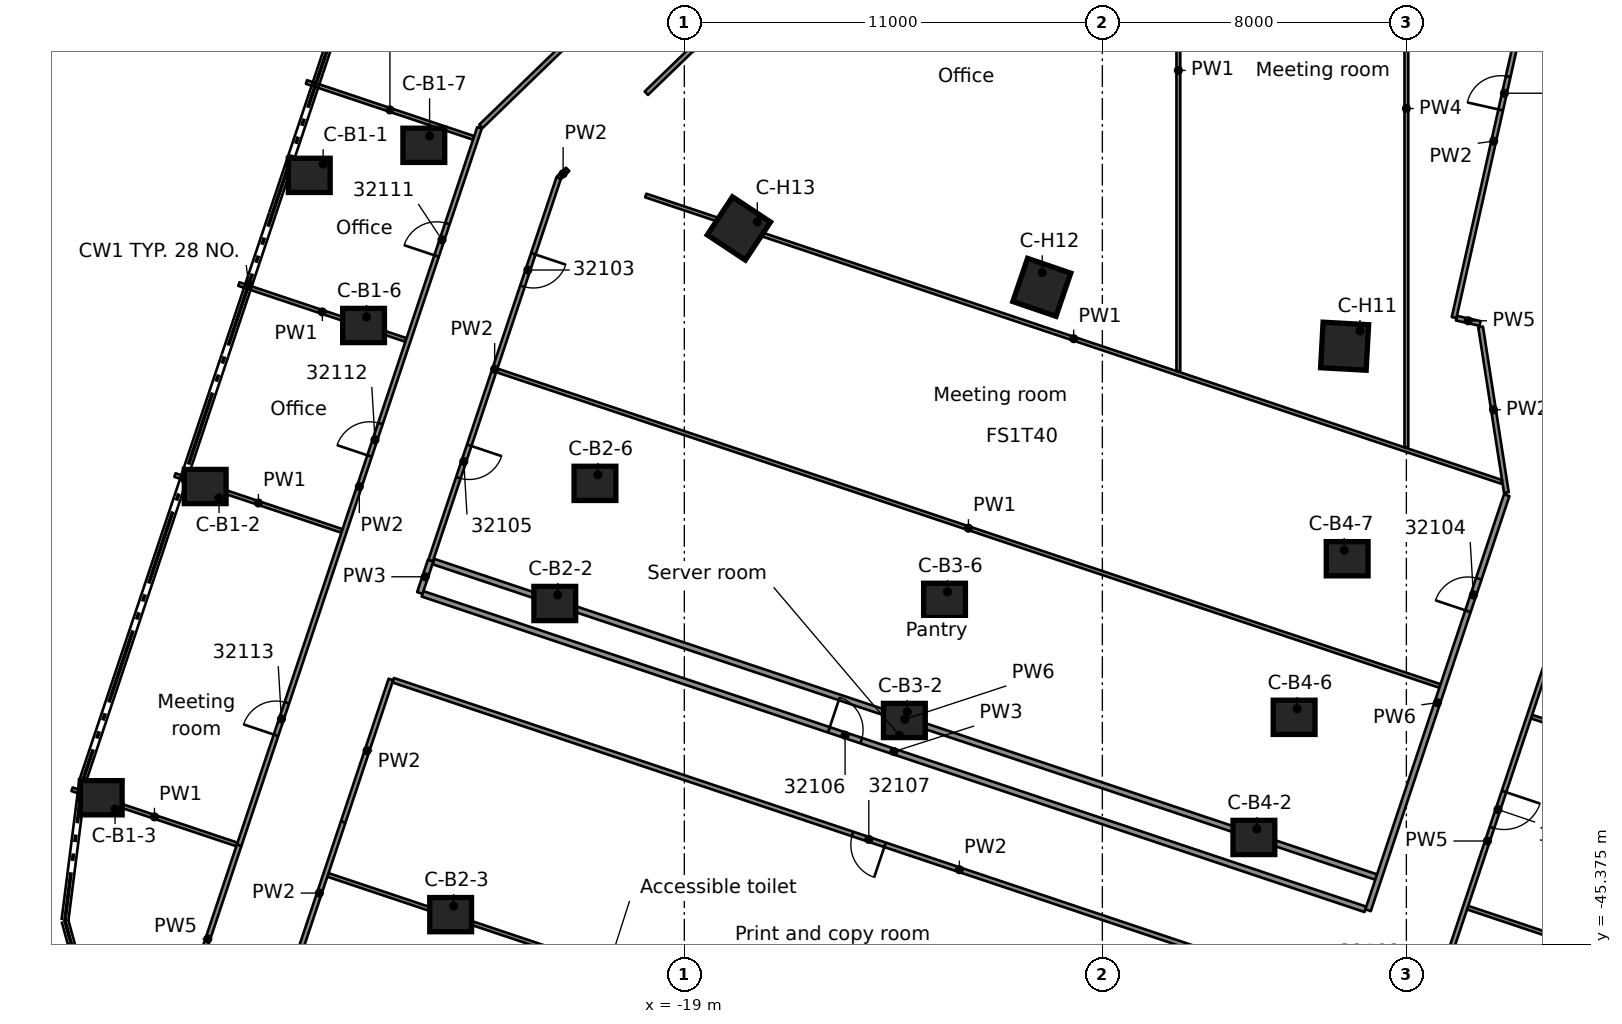
"""IFC4 building model, lengths in metres.
Left out: names, types, materials, properties, quantities, classifications, styles, units other than length and angle.
Written with IfcOpenShell. Run it as: python <this file> out.ifc"""

import sys

from ifc_helpers import new_model, si_unit, direction, frame, frame_2d, origin, origin_2d, place, context, subcontext, project, spatial, rectangle, extrude, element, fill, save


model = new_model("IFC4")
c1 = context("Model", 3, precision=1e-05, world=origin(), true_north=direction((0.0, 1.0)))
c2 = subcontext(c1, "Body", "Model", "MODEL_VIEW")
j1 = project(units=[si_unit("LENGTHUNIT", "METRE"), si_unit("PLANEANGLEUNIT", "RADIAN")], contexts=[c1])
p1 = place(None, origin())
s1 = spatial("IfcSite", under=j1, at=p1, CompositionType="ELEMENT")
p2 = place(p1, origin())
s2 = spatial("IfcBuilding", under=s1, at=p2, CompositionType="ELEMENT")
p3 = place(p2, frame((0.0, 0.0, 159.6)))
s3 = spatial("IfcBuildingStorey", under=s2, at=p3, CompositionType="ELEMENT", Elevation=159.6)
for number, where, z_axis, x_axis in (
    (1, (-28.869, -25.139, 0.0), (0.0, 0.0, 1.0), (1.0, 0.0, 0.0)),
    (2, (-31.608, -33.326, 0.0), (0.0, 0.0, 1.0), (1.0, 0.0, 0.0)),
    (3, (-34.344, -41.515, 0.0), (0.0, 0.0, 1.0), (1.0, 0.0, 0.0)),
    (4, (-27.441, -29.089, 0.0), (0.0, 0.0, 1.0), (1.0, 0.0, 0.0)),
    (5, (-25.855, -24.348, 0.0), (0.0, 0.0, 1.0), (1.0, 0.0, 0.0)),
    (6, (-22.409, -36.404, 0.0), (0.0, 0.0, 1.0), (1.0, 0.0, 0.0)),
    (7, (-25.149, -44.591, 0.0), (0.0, 0.0, 1.0), (1.0, 0.0, 0.0)),
    (8, (-21.352, -33.243, 0.0), (0.0, 0.0, 1.0), (1.0, 0.0, 0.0)),
    (9, (-13.21, -39.482, 0.0), (0.0, 0.0, 1.0), (1.0, 0.0, 0.0)),
    (10, (-12.153, -36.321, 0.0), (0.0, 0.0, 1.0), (1.0, 0.0, 0.0)),
    (11, (-4.012, -42.56, 0.0), (0.0, 0.0, 1.0), (1.0, 0.0, 0.0)),
    (12, (-2.954, -39.399, 0.0), (0.0, 0.0, 1.0), (1.0, 0.0, 0.0)),
    (13, (-1.558, -35.226, 0.0), (0.0, 0.0, 1.0), (1.0, 0.0, 0.0)),
):
    element("IfcColumn", number, at=place(p3, frame(where, z_axis=z_axis, x_axis=x_axis)), inside=s3, PredefinedType="COLUMN", context=c2, shape_type="SweptSolid", body=[
        extrude(rectangle(XDim=1.1, YDim=0.9, at=origin_2d()), origin(), (0.0, 0.0, 1.0), 3.5),
    ])
for number, where, z_axis, x_axis in (
    (14, (-1.625, -29.634, 0.0), (0.0, 0.0, 1.0), (-0.055, -0.998, 0.0)),
    (15, (-9.594, -28.085, 0.0), (0.0, 0.0, 1.0), (-0.323, -0.946, 0.0)),
    (16, (-17.564, -26.536, 0.0), (0.0, 0.0, 1.0), (-0.552, -0.834, 0.0)),
):
    element("IfcColumn", number, at=place(p3, frame(where, z_axis=z_axis, x_axis=x_axis)), inside=s3, PredefinedType="COLUMN", context=c2, shape_type="SweptSolid", body=[
        extrude(rectangle(XDim=1.2, YDim=1.2, at=origin_2d()), origin(), (0.0, 0.0, 1.0), 3.5),
    ])
p4 = place(p3, frame((2.632, -33.485, 0.0), z_axis=(0.0, 0.0, 1.0), x_axis=(-0.153953145405, 0.988078149247, 0.0)))
e17 = element("IfcWall", 17, at=p4, inside=s3, PredefinedType="PARTITIONING", context=c2, shape_type="SweptSolid", body=[
    extrude(rectangle(XDim=4.412, YDim=0.125, at=frame_2d((2.206, 0.0))), origin(), (0.0, 0.0, 1.0), 3.08),
])
p5 = place(p3, frame((-35.112, -41.292, 0.0), z_axis=(0.0, 0.0, 1.0), x_axis=(0.94831984375, -0.317316047419, 0.0)))
e18 = element("IfcWall", 18, at=p5, inside=s3, PredefinedType="PARTITIONING", context=c2, shape_type="SweptSolid", body=[
    extrude(rectangle(XDim=4.576, YDim=0.1, at=frame_2d((2.288, 0.0))), origin(), (0.0, 0.0, 1.0), 3.08),
])
p6 = place(p3, frame((-28.378, -43.546, 0.0), z_axis=(0.0, 0.0, 1.0), x_axis=(0.948326561211, -0.317295971139, 0.0)))
e19 = element("IfcWall", 19, at=p6, inside=s3, PredefinedType="PARTITIONING", context=c2, shape_type="SweptSolid", body=[
    extrude(rectangle(XDim=26.187, YDim=0.1, at=frame_2d((13.094, 0.0))), origin(), (0.0, 0.0, 1.0), 2.445),
])
p7 = place(p3, frame((-1.829, -46.732, 0.0), z_axis=(0.0, 0.0, 1.0), x_axis=(-0.948329366448, 0.317287586791, 0.0)))
e20 = element("IfcWall", 20, at=p7, inside=s3, PredefinedType="PARTITIONING", context=c2, shape_type="SweptSolid", body=[
    extrude(rectangle(XDim=26.187, YDim=0.125, at=frame_2d((13.094, 0.0))), origin(), (0.0, 0.0, 1.0), 3.08),
])
p8 = place(p7, frame((12.538, 0.0, 0.0)))
e21 = element("IfcOpeningElement", 21, at=p8, cuts=e20, PredefinedType="OPENING", context=c2, shape_type="SweptSolid", body=[
    extrude(rectangle(XDim=0.9, YDim=2.1, at=frame_2d((0.45, 1.05))), frame((0.0, 0.073, 0.0), z_axis=(0.0, -1.0, 0.0), x_axis=(1.0, 0.0, 0.0)), (0.0, 0.0, 1.0), 0.145),
])
p9 = place(p3, frame((-25.889, -36.15, 0.0), z_axis=(0.0, 0.0, 1.0), x_axis=(0.94832621322, -0.317297011205, 0.0)))
e22 = element("IfcWall", 22, at=p9, inside=s3, PredefinedType="PARTITIONING", context=c2, shape_type="SweptSolid", body=[
    extrude(rectangle(XDim=26.162, YDim=0.15, at=frame_2d((13.081, 0.0))), origin(), (0.0, 0.0, 1.0), 3.08),
])
p10 = place(p9, frame((11.275, 0.0, 0.0)))
e23 = element("IfcOpeningElement", 23, at=p10, cuts=e22, PredefinedType="OPENING", context=c2, shape_type="SweptSolid", body=[
    extrude(rectangle(XDim=0.9, YDim=2.1, at=frame_2d((0.45, 1.05))), frame((0.0, 0.085, 0.0), z_axis=(0.0, -1.0, 0.0), x_axis=(1.0, 0.0, 0.0)), (0.0, 0.0, 1.0), 0.17),
])
p11 = place(p3, frame((-32.404, -33.025, 0.0), z_axis=(0.0, 0.0, 1.0), x_axis=(0.948382448694, -0.317128887062, 0.0)))
e24 = element("IfcWall", 24, at=p11, inside=s3, PredefinedType="PARTITIONING", context=c2, shape_type="SweptSolid", body=[
    extrude(rectangle(XDim=4.632, YDim=0.1, at=frame_2d((2.316, 0.0))), origin(), (0.0, 0.0, 1.0), 3.08),
])
p12 = place(p3, frame((-25.605, -35.3, 0.0), z_axis=(0.0, 0.0, 1.0), x_axis=(0.948327152728, -0.317294203223, 0.0)))
e25 = element("IfcWall", 25, at=p12, inside=s3, PredefinedType="PARTITIONING", context=c2, shape_type="SweptSolid", body=[
    extrude(rectangle(XDim=26.162, YDim=0.15, at=frame_2d((13.081, 0.0))), origin(), (0.0, 0.0, 1.0), 2.445),
])
p13 = place(p3, frame((1.612, -44.407, 0.0), z_axis=(0.0, 0.0, 1.0), x_axis=(0.948334710824, -0.317271612734, 0.0)))
e26 = element("IfcWall", 26, at=p13, inside=s3, PredefinedType="PARTITIONING", context=c2, shape_type="SweptSolid", body=[
    extrude(rectangle(XDim=4.63, YDim=0.1, at=frame_2d((2.315, 0.0))), origin(), (0.0, 0.0, 1.0), 2.445),
])
p14 = place(p3, frame((-30.722, -27.999, 0.0), z_axis=(0.0, 0.0, 1.0), x_axis=(0.948355935611, -0.317208164132, 0.0)))
e27 = element("IfcWall", 27, at=p14, inside=s3, PredefinedType="PARTITIONING", context=c2, shape_type="SweptSolid", body=[
    extrude(rectangle(XDim=4.631, YDim=0.1, at=frame_2d((2.315, 0.0))), origin(), (0.0, 0.0, 1.0), 3.08),
])
p15 = place(p3, frame((-23.935, -30.27, 0.0), z_axis=(0.0, 0.0, 1.0), x_axis=(0.948328260126, -0.317290893418, 0.0)))
e28 = element("IfcWall", 28, at=p15, inside=s3, PredefinedType="PARTITIONING", context=c2, shape_type="SweptSolid", body=[
    extrude(rectangle(XDim=26.175, YDim=0.1, at=frame_2d((13.087, 0.0))), origin(), (0.0, 0.0, 1.0), 3.08),
])
p16 = place(p3, frame((3.294, -39.38, 0.0), z_axis=(0.0, 0.0, 1.0), x_axis=(0.948260676976, -0.317492816455, 0.0)))
e29 = element("IfcWall", 29, at=p16, inside=s3, PredefinedType="PARTITIONING", context=c2, shape_type="SweptSolid", body=[
    extrude(rectangle(XDim=4.631, YDim=0.1, at=frame_2d((2.315, 0.0))), origin(), (0.0, 0.0, 1.0), 3.08),
])
p17 = place(p3, frame((-28.943, -22.682, 0.0), z_axis=(0.0, 0.0, 1.0), x_axis=(0.948361239818, -0.317192305725, 0.0)))
e30 = element("IfcWall", 30, at=p17, inside=s3, PredefinedType="PARTITIONING", context=c2, shape_type="SweptSolid", body=[
    extrude(rectangle(XDim=4.631, YDim=0.1, at=frame_2d((2.316, 0.0))), origin(), (0.0, 0.0, 1.0), 3.08),
])
p18 = place(p3, frame((-20.015, -25.669, 0.0), z_axis=(0.0, 0.0, 1.0), x_axis=(0.948326995597, -0.317294672854, 0.0)))
e31 = element("IfcWall", 31, at=p18, inside=s3, PredefinedType="PARTITIONING", context=c2, shape_type="SweptSolid", body=[
    extrude(rectangle(XDim=23.748, YDim=0.1, at=frame_2d((11.874, 0.0))), origin(), (0.0, 0.0, 1.0), 3.08),
])
p19 = place(p3, frame((1.317, -28.896, 0.0), z_axis=(0.0, 0.0, 1.0), x_axis=(0.9759612217, -0.217944244563, 0.0)))
e32 = element("IfcWall", 32, at=p19, inside=s3, PredefinedType="PARTITIONING", context=c2, shape_type="SweptSolid", body=[
    extrude(rectangle(XDim=0.637, YDim=0.125, at=frame_2d((0.319, 0.0))), origin(), (0.0, 0.0, 1.0), 2.445),
])
p20 = place(p3, frame((-24.354, -23.85, 0.0), z_axis=(0.0, 0.0, 1.0), x_axis=(0.718717121229, 0.695302595747, 0.0)))
e33 = element("IfcWall", 33, at=p20, inside=s3, PredefinedType="PARTITIONING", context=c2, shape_type="SweptSolid", body=[
    extrude(rectangle(XDim=6.058, YDim=0.125, at=frame_2d((3.029, 0.0))), origin(), (0.0, 0.0, 1.0), 3.08),
])
p21 = place(p3, frame((-20.0, -22.978, 0.0), z_axis=(0.0, 0.0, 1.0), x_axis=(0.718705918195, 0.695314175859, 0.0)))
e34 = element("IfcWall", 34, at=p21, inside=s3, PredefinedType="PARTITIONING", context=c2, shape_type="SweptSolid", body=[
    extrude(rectangle(XDim=3.413, YDim=0.125, at=frame_2d((1.707, 0.0))), origin(), (0.0, 0.0, 1.0), 3.08),
])
p22 = place(p3, frame((-22.308, -25.211, 0.0), z_axis=(0.0, 0.0, 1.0), x_axis=(0.717743653734, 0.696307437505, 0.0)))
e35 = element("IfcWall", 35, at=p22, inside=s3, PredefinedType="PARTITIONING", context=c2, shape_type="SweptSolid", body=[
    extrude(rectangle(XDim=0.33, YDim=0.125, at=frame_2d((0.165, 0.0))), origin(), (0.0, 0.0, 1.0), 3.08),
])
p23 = place(p3, frame((5.014, -34.047, 0.0), z_axis=(0.0, 0.0, 1.0), x_axis=(-0.317385597106, -0.948296568986, 0.0)))
e36 = element("IfcWall", 36, at=p23, inside=s3, PredefinedType="PARTITIONING", context=c2, shape_type="SweptSolid", body=[
    extrude(rectangle(XDim=18.151, YDim=0.125, at=frame_2d((9.076, 0.0))), origin(), (0.0, 0.0, 1.0), 2.445),
])
p24 = place(p23, frame((2.347, 0.0, 0.0)))
e37 = element("IfcOpeningElement", 37, at=p24, cuts=e36, PredefinedType="OPENING", context=c2, shape_type="SweptSolid", body=[
    extrude(rectangle(XDim=1.0, YDim=2.1, at=frame_2d((0.5, 1.05))), frame((0.0, 0.073, 0.0), z_axis=(0.0, -1.0, 0.0), x_axis=(1.0, 0.0, 0.0)), (0.0, 0.0, 1.0), 0.145),
])
p25 = place(p23, frame((7.703, 0.0, 0.0)))
e38 = element("IfcOpeningElement", 38, at=p25, cuts=e36, PredefinedType="OPENING", context=c2, shape_type="SweptSolid", body=[
    extrude(rectangle(XDim=1.0, YDim=2.1, at=frame_2d((0.5, 1.05))), frame((0.0, 0.073, 0.0), z_axis=(0.0, -1.0, 0.0), x_axis=(1.0, 0.0, 0.0)), (0.0, 0.0, 1.0), 0.145),
])
p26 = place(p23, frame((12.399, 0.0, 0.0)))
e39 = element("IfcOpeningElement", 39, at=p26, cuts=e36, PredefinedType="OPENING", context=c2, shape_type="SweptSolid", body=[
    extrude(rectangle(XDim=1.0, YDim=2.1, at=frame_2d((0.5, 1.05))), frame((0.0, 0.073, 0.0), z_axis=(0.0, -1.0, 0.0), x_axis=(1.0, 0.0, 0.0)), (0.0, 0.0, 1.0), 0.145),
])
p27 = place(p3, frame((-1.008, -44.475, 0.0), z_axis=(0.0, 0.0, 1.0), x_axis=(0.316889155775, 0.948462578572, 0.0)))
e40 = element("IfcWall", 40, at=p27, inside=s3, PredefinedType="PARTITIONING", context=c2, shape_type="SweptSolid", body=[
    extrude(rectangle(XDim=11.516, YDim=0.15, at=frame_2d((5.758, 0.0))), origin(), (0.0, 0.0, 1.0), 2.445),
])
p28 = place(p27, frame((8.296, 0.0, 0.0)))
e41 = element("IfcOpeningElement", 41, at=p28, cuts=e40, PredefinedType="OPENING", context=c2, shape_type="SweptSolid", body=[
    extrude(rectangle(XDim=0.9, YDim=2.1, at=frame_2d((0.45, 1.05))), frame((0.0, 0.085, 0.0), z_axis=(0.0, -1.0, 0.0), x_axis=(1.0, 0.0, 0.0)), (0.0, 0.0, 1.0), 0.17),
])
p29 = place(p3, frame((-27.976, -42.15, 0.0), z_axis=(0.0, 0.0, 1.0), x_axis=(-0.317339720629, -0.94831192216, 0.0)))
e42 = element("IfcWall", 42, at=p29, inside=s3, PredefinedType="PARTITIONING", context=c2, shape_type="SweptSolid", body=[
    extrude(rectangle(XDim=3.951, YDim=0.125, at=frame_2d((1.976, 0.0))), origin(), (0.0, 0.0, 1.0), 3.08),
])
p30 = place(p3, frame((-27.976, -42.15, 0.0), z_axis=(0.0, 0.0, 1.0), x_axis=(0.317413881712, 0.948287101935, 0.0)))
e43 = element("IfcWall", 43, at=p30, inside=s3, PredefinedType="PARTITIONING", context=c2, shape_type="SweptSolid", body=[
    extrude(rectangle(XDim=3.951, YDim=0.125, at=frame_2d((1.976, 0.0))), origin(), (0.0, 0.0, 1.0), 3.08),
])
p31 = place(p3, frame((-22.307, -25.21, 0.0), z_axis=(0.0, 0.0, 1.0), x_axis=(-0.317400526235, -0.948291572221, 0.0)))
e44 = element("IfcWall", 44, at=p31, inside=s3, PredefinedType="PARTITIONING", context=c2, shape_type="SweptSolid", body=[
    extrude(rectangle(XDim=10.615, YDim=0.125, at=frame_2d((5.307, 0.0))), origin(), (0.0, 0.0, 1.0), 3.08),
])
p32 = place(p31, frame((2.101, 0.0, 0.0)))
e45 = element("IfcOpeningElement", 45, at=p32, cuts=e44, PredefinedType="OPENING", context=c2, shape_type="SweptSolid", body=[
    extrude(rectangle(XDim=0.9, YDim=2.1, at=frame_2d((0.45, 1.05))), frame((0.0, 0.073, 0.0), z_axis=(0.0, -1.0, 0.0), x_axis=(1.0, 0.0, 0.0)), (0.0, 0.0, 1.0), 0.145),
])
p33 = place(p31, frame((7.414, 0.0, 0.0)))
e46 = element("IfcOpeningElement", 46, at=p33, cuts=e44, PredefinedType="OPENING", context=c2, shape_type="SweptSolid", body=[
    extrude(rectangle(XDim=0.9, YDim=2.1, at=frame_2d((0.45, 1.05))), frame((0.0, 0.073, 0.0), z_axis=(0.0, -1.0, 0.0), x_axis=(1.0, 0.0, 0.0)), (0.0, 0.0, 1.0), 0.145),
])
p34 = place(p3, frame((-25.96, -36.126, 0.0), z_axis=(0.0, 0.0, 1.0), x_axis=(0.316799745903, 0.948492446462, 0.0)))
e47 = element("IfcWall", 47, at=p34, inside=s3, PredefinedType="PARTITIONING", context=c2, shape_type="SweptSolid", body=[
    extrude(rectangle(XDim=0.896, YDim=0.15, at=frame_2d((0.448, 0.0))), origin(), (0.0, 0.0, 1.0), 3.08),
])
p35 = place(p3, frame((-30.714, -42.764, 0.0), z_axis=(0.0, 0.0, 1.0), x_axis=(0.317699123241, 0.94819157721, 0.0)))
e48 = element("IfcWall", 48, at=p35, inside=s3, PredefinedType="PARTITIONING", context=c2, shape_type="SweptSolid", body=[
    extrude(rectangle(XDim=19.906, YDim=0.125, at=frame_2d((9.953, 0.0))), origin(), (0.0, 0.0, 1.0), 3.08),
])
p36 = place(p35, frame((16.35, 0.0, 0.0)))
e49 = element("IfcOpeningElement", 49, at=p36, cuts=e48, PredefinedType="OPENING", context=c2, shape_type="SweptSolid", body=[
    extrude(rectangle(XDim=0.9, YDim=2.1, at=frame_2d((0.45, 1.05))), frame((0.0, 0.073, 0.0), z_axis=(0.0, -1.0, 0.0), x_axis=(1.0, 0.0, 0.0)), (0.0, 0.0, 1.0), 0.145),
])
p37 = place(p35, frame((10.8, 0.0, 0.0)))
e50 = element("IfcOpeningElement", 50, at=p37, cuts=e48, PredefinedType="OPENING", context=c2, shape_type="SweptSolid", body=[
    extrude(rectangle(XDim=0.9, YDim=2.1, at=frame_2d((0.45, 1.05))), frame((0.0, 0.073, 0.0), z_axis=(0.0, -1.0, 0.0), x_axis=(1.0, 0.0, 0.0)), (0.0, 0.0, 1.0), 0.145),
])
p38 = place(p35, frame((3.051, 0.0, 0.0)))
e51 = element("IfcOpeningElement", 51, at=p38, cuts=e48, PredefinedType="OPENING", context=c2, shape_type="SweptSolid", body=[
    extrude(rectangle(XDim=0.9, YDim=2.1, at=frame_2d((0.45, 1.05))), frame((0.0, 0.073, 0.0), z_axis=(0.0, -1.0, 0.0), x_axis=(1.0, 0.0, 0.0)), (0.0, 0.0, 1.0), 0.145),
])
p39 = place(p3, frame((-30.715, -42.765, 0.0), z_axis=(0.0, 0.0, 1.0), x_axis=(-0.31696020199, -0.948438838489, 0.0)))
e52 = element("IfcWall", 52, at=p39, inside=s3, PredefinedType="PARTITIONING", context=c2, shape_type="SweptSolid", body=[
    extrude(rectangle(XDim=5.199, YDim=0.125, at=frame_2d((2.6, 0.0))), origin(), (0.0, 0.0, 1.0), 2.445),
])
p40 = place(p3, frame((1.256, -28.881, 0.0), z_axis=(0.0, 0.0, 1.0), x_axis=(0.218920699835, 0.975742654179, 0.0)))
e53 = element("IfcWall", 53, at=p40, inside=s3, PredefinedType="PARTITIONING", context=c2, shape_type="SweptSolid", body=[
    extrude(rectangle(XDim=11.895, YDim=0.125, at=frame_2d((5.947, 0.0))), origin(), (0.0, 0.0, 1.0), 3.08),
])
p41 = place(p40, frame((5.6, 0.0, 0.0)))
e54 = element("IfcOpeningElement", 54, at=p41, cuts=e53, PredefinedType="OPENING", context=c2, shape_type="SweptSolid", body=[
    extrude(rectangle(XDim=0.9, YDim=2.1, at=frame_2d((0.45, 1.05))), frame((0.0, 0.073, 0.0), z_axis=(0.0, -1.0, 0.0), x_axis=(1.0, 0.0, 0.0)), (0.0, 0.0, 1.0), 0.145),
])
p42 = place(p3, frame((0.0, -32.297, 0.0), z_axis=(0.0, 0.0, 1.0), x_axis=(0.0, 1.0, 0.0)))
e55 = element("IfcWall", 55, at=p42, inside=s3, PredefinedType="PARTITIONING", context=c2, shape_type="SweptSolid", body=[
    extrude(rectangle(XDim=17.834, YDim=0.1, at=frame_2d((8.917, 0.0))), origin(), (0.0, 0.0, 1.0), 2.445),
])
p43 = place(p3, frame((-6.0, -30.29, 0.0), z_axis=(0.0, 0.0, 1.0), x_axis=(0.0, 1.0, 0.0)))
e56 = element("IfcWall", 56, at=p43, inside=s3, PredefinedType="PARTITIONING", context=c2, shape_type="SweptSolid", body=[
    extrude(rectangle(XDim=15.827, YDim=0.1, at=frame_2d((7.914, 0.0))), origin(), (0.0, 0.0, 1.0), 3.08),
])
p44 = place(p25, origin())
e57 = element("IfcDoor", 57, at=p44, inside=s3, OperationType="SINGLE_SWING_LEFT", PredefinedType="DOOR", context=c2, shape_type="SweptSolid", body=[
    extrude(rectangle(XDim=1.0, YDim=2.1, at=frame_2d((0.5, 1.05))), frame((0.0, 0.025, 0.0), z_axis=(0.0, -1.0, 0.0), x_axis=(1.0, 0.0, 0.0)), (0.0, 0.0, 1.0), 0.05),
])
fill(e38, e57)
p45 = place(p32, origin())
e58 = element("IfcDoor", 58, at=p45, inside=s3, OperationType="SINGLE_SWING_LEFT", PredefinedType="DOOR", context=c2, shape_type="SweptSolid", body=[
    extrude(rectangle(XDim=0.9, YDim=2.1, at=frame_2d((0.45, 1.05))), frame((0.0, 0.025, 0.0), z_axis=(0.0, -1.0, 0.0), x_axis=(1.0, 0.0, 0.0)), (0.0, 0.0, 1.0), 0.05),
])
fill(e45, e58)
p46 = place(p28, origin())
e59 = element("IfcDoor", 59, at=p46, inside=s3, OperationType="SINGLE_SWING_RIGHT", PredefinedType="DOOR", context=c2, shape_type="SweptSolid", body=[
    extrude(rectangle(XDim=0.9, YDim=2.1, at=frame_2d((0.45, 1.05))), frame((0.0, 0.025, 0.0), z_axis=(0.0, -1.0, 0.0), x_axis=(1.0, 0.0, 0.0)), (0.0, 0.0, 1.0), 0.05),
])
fill(e41, e59)
p47 = place(p33, origin())
e60 = element("IfcDoor", 60, at=p47, inside=s3, OperationType="SINGLE_SWING_RIGHT", PredefinedType="DOOR", context=c2, shape_type="SweptSolid", body=[
    extrude(rectangle(XDim=0.9, YDim=2.1, at=frame_2d((0.45, 1.05))), frame((0.0, 0.025, 0.0), z_axis=(0.0, -1.0, 0.0), x_axis=(1.0, 0.0, 0.0)), (0.0, 0.0, 1.0), 0.05),
])
fill(e46, e60)
p48 = place(p10, origin())
e61 = element("IfcDoor", 61, at=p48, inside=s3, OperationType="SINGLE_SWING_LEFT", PredefinedType="DOOR", context=c2, shape_type="SweptSolid", body=[
    extrude(rectangle(XDim=0.9, YDim=2.1, at=frame_2d((0.45, 1.05))), frame((0.0, 0.025, 0.0), z_axis=(0.0, -1.0, 0.0), x_axis=(1.0, 0.0, 0.0)), (0.0, 0.0, 1.0), 0.05),
])
fill(e23, e61)
p49 = place(p8, origin())
e62 = element("IfcDoor", 62, at=p49, inside=s3, OperationType="SINGLE_SWING_LEFT", PredefinedType="DOOR", context=c2, shape_type="SweptSolid", body=[
    extrude(rectangle(XDim=0.9, YDim=2.1, at=frame_2d((0.45, 1.05))), frame((0.0, 0.025, 0.0), z_axis=(0.0, -1.0, 0.0), x_axis=(1.0, 0.0, 0.0)), (0.0, 0.0, 1.0), 0.05),
])
fill(e21, e62)
p50 = place(p36, origin())
e63 = element("IfcDoor", 63, at=p50, inside=s3, OperationType="SINGLE_SWING_RIGHT", PredefinedType="DOOR", context=c2, shape_type="SweptSolid", body=[
    extrude(rectangle(XDim=0.9, YDim=2.1, at=frame_2d((0.45, 1.05))), frame((0.0, 0.025, 0.0), z_axis=(0.0, -1.0, 0.0), x_axis=(1.0, 0.0, 0.0)), (0.0, 0.0, 1.0), 0.05),
])
fill(e49, e63)
p51 = place(p37, origin())
e64 = element("IfcDoor", 64, at=p51, inside=s3, OperationType="SINGLE_SWING_RIGHT", PredefinedType="DOOR", context=c2, shape_type="SweptSolid", body=[
    extrude(rectangle(XDim=0.9, YDim=2.1, at=frame_2d((0.45, 1.05))), frame((0.0, 0.025, 0.0), z_axis=(0.0, -1.0, 0.0), x_axis=(1.0, 0.0, 0.0)), (0.0, 0.0, 1.0), 0.05),
])
fill(e50, e64)
p52 = place(p38, origin())
e65 = element("IfcDoor", 65, at=p52, inside=s3, OperationType="SINGLE_SWING_LEFT", PredefinedType="DOOR", context=c2, shape_type="SweptSolid", body=[
    extrude(rectangle(XDim=0.9, YDim=2.1, at=frame_2d((0.45, 1.05))), frame((0.0, 0.025, 0.0), z_axis=(0.0, -1.0, 0.0), x_axis=(1.0, 0.0, 0.0)), (0.0, 0.0, 1.0), 0.05),
])
fill(e51, e65)
p53 = place(p41, origin())
e66 = element("IfcDoor", 66, at=p53, inside=s3, OperationType="SINGLE_SWING_RIGHT", PredefinedType="DOOR", context=c2, shape_type="SweptSolid", body=[
    extrude(rectangle(XDim=0.9, YDim=2.1, at=frame_2d((0.45, 1.05))), frame((0.0, 0.025, 0.0), z_axis=(0.0, -1.0, 0.0), x_axis=(1.0, 0.0, 0.0)), (0.0, 0.0, 1.0), 0.05),
])
fill(e54, e66)
save(model, sys.argv[1])
